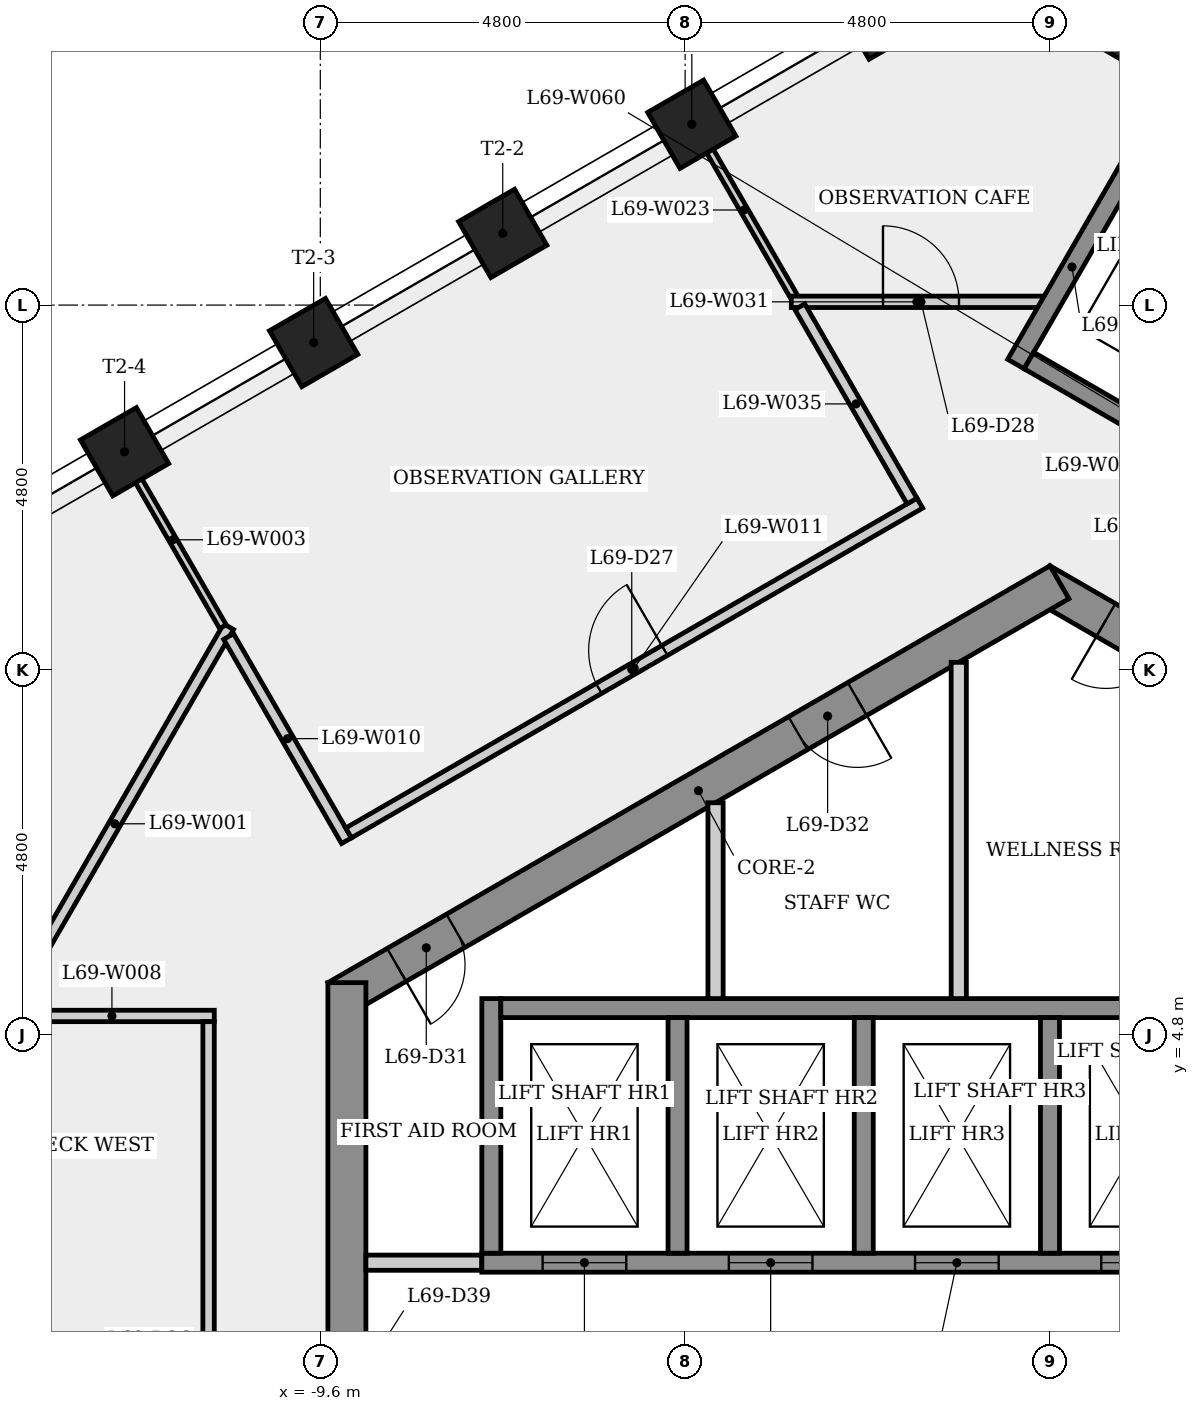
"""IFC4 building model, lengths in metres.
Left out: names, types, materials, properties, quantities, classifications, styles, units other than length and angle.
Written with IfcOpenShell. Run it as: python <this file> out.ifc"""

import sys

from ifc_helpers import new_model, si_unit, direction, frame, frame_2d, origin, origin_2d, place, context, subcontext, project, spatial, rectangle, extrude, element, fill, save


model = new_model("IFC4")
c1 = context("Model", 3, precision=1e-05, world=origin(), true_north=direction((0.0, 1.0)))
c2 = subcontext(c1, "Body", "Model", "MODEL_VIEW")
j1 = project(units=[si_unit("LENGTHUNIT", "METRE"), si_unit("PLANEANGLEUNIT", "RADIAN")], contexts=[c1])
p1 = place(None, origin())
s1 = spatial("IfcSite", under=j1, at=p1, CompositionType="ELEMENT")
p2 = place(p1, origin())
s2 = spatial("IfcBuilding", under=s1, at=p2, CompositionType="ELEMENT")
p3 = place(p2, frame((0.0, 0.0, 257.9)))
s3 = spatial("IfcBuildingStorey", under=s2, at=p3, CompositionType="ELEMENT", Elevation=257.9)
p4 = place(p3, frame((9.375, 5.268, 0.0), z_axis=(0.0, 0.0, 1.0), x_axis=(-0.866023993627, 0.500002442456, 0.0)))
e1 = element("IfcWall", 1, at=p4, inside=s3, PredefinedType="SHEAR", context=c2, shape_type="SweptSolid", body=[
    extrude(rectangle(XDim=10.97, YDim=0.5, at=frame_2d((5.485, 0.0))), origin(), (0.0, 0.0, 1.0), 5.0),
])
p5 = place(p4, frame((9.076, 0.0, 0.0)))
e2 = element("IfcOpeningElement", 2, at=p5, cuts=e1, PredefinedType="OPENING", context=c2, shape_type="SweptSolid", body=[
    extrude(rectangle(XDim=0.9, YDim=2.1, at=frame_2d((0.45, 1.05))), frame((0.0, 0.26, 0.0), z_axis=(0.0, -1.0, 0.0), x_axis=(1.0, 0.0, 0.0)), (0.0, 0.0, 1.0), 0.52),
])
p6 = place(p4, frame((3.858, 0.0, 0.0)))
e3 = element("IfcOpeningElement", 3, at=p6, cuts=e1, PredefinedType="OPENING", context=c2, shape_type="SweptSolid", body=[
    extrude(rectangle(XDim=0.9, YDim=2.1, at=frame_2d((0.45, 1.05))), frame((0.0, 0.26, 0.0), z_axis=(0.0, -1.0, 0.0), x_axis=(1.0, 0.0, 0.0)), (0.0, 0.0, 1.0), 0.52),
])
p7 = place(p3, frame((0.125, 10.753, 0.0), z_axis=(0.0, 0.0, 1.0), x_axis=(-0.866023993627, -0.500002442456, 0.0)))
e4 = element("IfcWall", 4, at=p7, inside=s3, PredefinedType="SHEAR", context=c2, shape_type="SweptSolid", body=[
    extrude(rectangle(XDim=10.97, YDim=0.5, at=frame_2d((5.485, 0.0))), origin(), (0.0, 0.0, 1.0), 5.0),
])
p8 = place(p7, frame((9.17, 0.0, 0.0)))
e5 = element("IfcOpeningElement", 5, at=p8, cuts=e4, PredefinedType="OPENING", context=c2, shape_type="SweptSolid", body=[
    extrude(rectangle(XDim=0.9, YDim=2.1, at=frame_2d((0.45, 1.05))), frame((0.0, 0.26, 0.0), z_axis=(0.0, -1.0, 0.0), x_axis=(1.0, 0.0, 0.0)), (0.0, 0.0, 1.0), 0.52),
])
p9 = place(p7, frame((3.073, 0.0, 0.0)))
e6 = element("IfcOpeningElement", 6, at=p9, cuts=e4, PredefinedType="OPENING", context=c2, shape_type="SweptSolid", body=[
    extrude(rectangle(XDim=0.9, YDim=2.1, at=frame_2d((0.45, 1.05))), frame((0.0, 0.26, 0.0), z_axis=(0.0, -1.0, 0.0), x_axis=(1.0, 0.0, 0.0)), (0.0, 0.0, 1.0), 0.52),
])
p10 = place(p3, frame((-9.25, 5.485, 0.0), z_axis=(0.0, 0.0, 1.0), x_axis=(0.0, -1.0, 0.0)))
e7 = element("IfcWall", 7, at=p10, inside=s3, PredefinedType="SHEAR", context=c2, shape_type="SweptSolid", body=[
    extrude(rectangle(XDim=10.97, YDim=0.5, at=frame_2d((5.485, 0.0))), origin(), (0.0, 0.0, 1.0), 5.0),
])
p11 = place(p10, frame((8.51, 0.0, 0.0)))
e8 = element("IfcOpeningElement", 8, at=p11, cuts=e7, PredefinedType="OPENING", context=c2, shape_type="SweptSolid", body=[
    extrude(rectangle(XDim=0.9, YDim=2.1, at=frame_2d((0.45, 1.05))), frame((0.0, 0.26, 0.0), z_axis=(0.0, -1.0, 0.0), x_axis=(1.0, 0.0, 0.0)), (0.0, 0.0, 1.0), 0.52),
])
p12 = place(p10, frame((4.685, 0.0, 0.0)))
e9 = element("IfcOpeningElement", 9, at=p12, cuts=e7, PredefinedType="OPENING", context=c2, shape_type="SweptSolid", body=[
    extrude(rectangle(XDim=1.6, YDim=2.1, at=frame_2d((0.8, 1.05))), frame((0.0, 0.26, 0.0), z_axis=(0.0, -1.0, 0.0), x_axis=(1.0, 0.0, 0.0)), (0.0, 0.0, 1.0), 0.52),
])
for number, where, z_axis, x_axis in (
    (10, (0.776, 18.216, 0.0), (0.0, 0.0, 1.0), (0.5, 0.866, 0.0)),
    (11, (-2.224, 18.216, 0.0), (0.0, 0.0, 1.0), (-0.5, 0.866, 0.0)),
    (12, (-4.712, 16.78, 0.0), (0.0, 0.0, 1.0), (-0.5, 0.866, 0.0)),
    (13, (-7.2, 15.343, 0.0), (0.0, 0.0, 1.0), (-0.5, 0.866, 0.0)),
    (14, (-9.688, 13.907, 0.0), (0.0, 0.0, 1.0), (-0.5, 0.866, 0.0)),
    (15, (-12.175, 12.47, 0.0), (0.0, 0.0, 1.0), (-0.5, 0.866, 0.0)),
):
    element("IfcColumn", number, at=place(p3, frame(where, z_axis=z_axis, x_axis=x_axis)), inside=s3, PredefinedType="COLUMN", context=c2, shape_type="SweptSolid", body=[
        extrude(rectangle(XDim=0.85, YDim=0.85, at=origin_2d()), origin(), (0.0, 0.0, 1.0), 5.0),
    ])
p13 = place(p3, frame((-13.801, 4.982, 0.0), z_axis=(0.0, 0.0, 1.0), x_axis=(0.499988265988, 0.866032178313, 0.0)))
e16 = element("IfcWall", 16, at=p13, inside=s3, PredefinedType="PARTITIONING", context=c2, shape_type="SweptSolid", body=[
    extrude(rectangle(XDim=5.99, YDim=0.15, at=frame_2d((2.995, 0.0))), origin(), (0.0, 0.0, 1.0), 4.6),
])
p14 = place(p3, frame((-12.201, 12.455, 0.0), z_axis=(0.0, 0.0, 1.0), x_axis=(0.499967916833, -0.866043926217, 0.0)))
e17 = element("IfcWall", 17, at=p14, inside=s3, PredefinedType="PARTITIONING", context=c2, shape_type="SweptSolid", body=[
    extrude(rectangle(XDim=2.64, YDim=0.1, at=frame_2d((1.32, 0.0))), origin(), (0.0, 0.0, 1.0), 4.6),
])
p15 = place(p3, frame((-10.995, 5.047, 0.0), z_axis=(0.0, 0.0, 1.0), x_axis=(-1.0, 0.0, 0.0)))
e18 = element("IfcWall", 18, at=p15, inside=s3, PredefinedType="PARTITIONING", context=c2, shape_type="SweptSolid", body=[
    extrude(rectangle(XDim=2.693, YDim=0.15, at=frame_2d((1.347, 0.0))), origin(), (0.0, 0.0, 1.0), 4.6),
])
p16 = place(p3, frame((-11.07, -4.972, 0.0), z_axis=(0.0, 0.0, 1.0), x_axis=(0.0, 1.0, 0.0)))
e19 = element("IfcWall", 19, at=p16, inside=s3, PredefinedType="PARTITIONING", context=c2, shape_type="SweptSolid", body=[
    extrude(rectangle(XDim=9.943, YDim=0.15, at=frame_2d((4.972, 0.0))), origin(), (0.0, 0.0, 1.0), 4.6),
])
p17 = place(p16, frame((4.472, 0.0, 0.0)))
e20 = element("IfcOpeningElement", 20, at=p17, cuts=e19, PredefinedType="OPENING", context=c2, shape_type="SweptSolid", body=[
    extrude(rectangle(XDim=1.0, YDim=2.1, at=frame_2d((0.5, 1.05))), frame((0.0, 0.085, 0.0), z_axis=(0.0, -1.0, 0.0), x_axis=(1.0, 0.0, 0.0)), (0.0, 0.0, 1.0), 0.17),
])
p18 = place(p3, frame((-10.806, 10.039, 0.0), z_axis=(0.0, 0.0, 1.0), x_axis=(0.499990416364, -0.866030936828, 0.0)))
e21 = element("IfcWall", 21, at=p18, inside=s3, PredefinedType="PARTITIONING", context=c2, shape_type="SweptSolid", body=[
    extrude(rectangle(XDim=3.102, YDim=0.15, at=frame_2d((1.551, 0.0))), origin(), (0.0, 0.0, 1.0), 4.6),
])
p19 = place(p3, frame((-9.228, 7.455, 0.0), z_axis=(0.0, 0.0, 1.0), x_axis=(0.866027239396, 0.499996820614, 0.0)))
e22 = element("IfcWall", 22, at=p19, inside=s3, PredefinedType="PARTITIONING", context=c2, shape_type="SweptSolid", body=[
    extrude(rectangle(XDim=8.678, YDim=0.15, at=frame_2d((4.339, 0.0))), origin(), (0.0, 0.0, 1.0), 4.6),
])
p20 = place(p19, frame((3.802, 0.0, 0.0)))
e23 = element("IfcOpeningElement", 23, at=p20, cuts=e22, PredefinedType="OPENING", context=c2, shape_type="SweptSolid", body=[
    extrude(rectangle(XDim=1.0, YDim=2.1, at=frame_2d((0.5, 1.05))), frame((0.0, 0.085, 0.0), z_axis=(0.0, -1.0, 0.0), x_axis=(1.0, 0.0, 0.0)), (0.0, 0.0, 1.0), 0.17),
])
p21 = place(p3, frame((-9.0, 1.8, 0.0), z_axis=(0.0, 0.0, 1.0), x_axis=(1.0, 0.0, 0.0)))
e24 = element("IfcWall", 24, at=p21, inside=s3, PredefinedType="PARTITIONING", context=c2, shape_type="SweptSolid", body=[
    extrude(rectangle(XDim=1.525, YDim=0.2, at=frame_2d((0.763, 0.0))), origin(), (0.0, 0.0, 1.0), 4.6),
])
p22 = place(p3, frame((-7.475, 1.8, 0.0), z_axis=(0.0, 0.0, 1.0), x_axis=(1.0, 0.0, 0.0)))
e25 = element("IfcWall", 25, at=p22, inside=s3, PredefinedType="SHEAR", context=c2, shape_type="SweptSolid", body=[
    extrude(rectangle(XDim=14.95, YDim=0.25, at=frame_2d((7.475, 0.0))), origin(), (0.0, 0.0, 1.0), 4.6),
])
p23 = place(p22, frame((0.8, 0.0, 0.0)))
e26 = element("IfcOpeningElement", 26, at=p23, cuts=e25, PredefinedType="OPENING", context=c2, shape_type="SweptSolid", body=[
    extrude(rectangle(XDim=1.1, YDim=2.1, at=frame_2d((0.55, 1.05))), frame((0.0, 0.135, 0.0), z_axis=(0.0, -1.0, 0.0), x_axis=(1.0, 0.0, 0.0)), (0.0, 0.0, 1.0), 0.27),
])
p24 = place(p22, frame((3.25, 0.0, 0.0)))
e27 = element("IfcOpeningElement", 27, at=p24, cuts=e25, PredefinedType="OPENING", context=c2, shape_type="SweptSolid", body=[
    extrude(rectangle(XDim=1.1, YDim=2.1, at=frame_2d((0.55, 1.05))), frame((0.0, 0.135, 0.0), z_axis=(0.0, -1.0, 0.0), x_axis=(1.0, 0.0, 0.0)), (0.0, 0.0, 1.0), 0.27),
])
p25 = place(p22, frame((5.7, 0.0, 0.0)))
e28 = element("IfcOpeningElement", 28, at=p25, cuts=e25, PredefinedType="OPENING", context=c2, shape_type="SweptSolid", body=[
    extrude(rectangle(XDim=1.1, YDim=2.1, at=frame_2d((0.55, 1.05))), frame((0.0, 0.135, 0.0), z_axis=(0.0, -1.0, 0.0), x_axis=(1.0, 0.0, 0.0)), (0.0, 0.0, 1.0), 0.27),
])
p26 = place(p22, frame((8.15, 0.0, 0.0)))
e29 = element("IfcOpeningElement", 29, at=p26, cuts=e25, PredefinedType="OPENING", context=c2, shape_type="SweptSolid", body=[
    extrude(rectangle(XDim=1.1, YDim=2.1, at=frame_2d((0.55, 1.05))), frame((0.0, 0.135, 0.0), z_axis=(0.0, -1.0, 0.0), x_axis=(1.0, 0.0, 0.0)), (0.0, 0.0, 1.0), 0.27),
])
p27 = place(p22, frame((10.6, 0.0, 0.0)))
e30 = element("IfcOpeningElement", 30, at=p27, cuts=e25, PredefinedType="OPENING", context=c2, shape_type="SweptSolid", body=[
    extrude(rectangle(XDim=1.1, YDim=2.1, at=frame_2d((0.55, 1.05))), frame((0.0, 0.135, 0.0), z_axis=(0.0, -1.0, 0.0), x_axis=(1.0, 0.0, 0.0)), (0.0, 0.0, 1.0), 0.27),
])
p28 = place(p22, frame((13.05, 0.0, 0.0)))
e31 = element("IfcOpeningElement", 31, at=p28, cuts=e25, PredefinedType="OPENING", context=c2, shape_type="SweptSolid", body=[
    extrude(rectangle(XDim=1.1, YDim=2.1, at=frame_2d((0.55, 1.05))), frame((0.0, 0.135, 0.0), z_axis=(0.0, -1.0, 0.0), x_axis=(1.0, 0.0, 0.0)), (0.0, 0.0, 1.0), 0.27),
])
p29 = place(p3, frame((-7.35, 1.925, 0.0), z_axis=(0.0, 0.0, 1.0), x_axis=(0.0, 1.0, 0.0)))
e32 = element("IfcWall", 32, at=p29, inside=s3, PredefinedType="SHEAR", context=c2, shape_type="SweptSolid", body=[
    extrude(rectangle(XDim=3.35, YDim=0.25, at=frame_2d((1.675, 0.0))), origin(), (0.0, 0.0, 1.0), 4.6),
])
p30 = place(p3, frame((-7.225, 5.15, 0.0), z_axis=(0.0, 0.0, 1.0), x_axis=(1.0, 0.0, 0.0)))
e33 = element("IfcWall", 33, at=p30, inside=s3, PredefinedType="SHEAR", context=c2, shape_type="SweptSolid", body=[
    extrude(rectangle(XDim=14.7, YDim=0.25, at=frame_2d((7.35, 0.0))), origin(), (0.0, 0.0, 1.0), 4.6),
])
p31 = place(p3, frame((-4.9, 5.025, 0.0), z_axis=(0.0, 0.0, 1.0), x_axis=(0.0, -1.0, 0.0)))
e34 = element("IfcWall", 34, at=p31, inside=s3, PredefinedType="SHEAR", context=c2, shape_type="SweptSolid", body=[
    extrude(rectangle(XDim=3.1, YDim=0.25, at=frame_2d((1.55, 0.0))), origin(), (0.0, 0.0, 1.0), 4.6),
])
p32 = place(p3, frame((-4.686, 16.795, 0.0), z_axis=(0.0, 0.0, 1.0), x_axis=(0.49999722832, -0.866027004008, 0.0)))
e35 = element("IfcWall", 35, at=p32, inside=s3, PredefinedType="PARTITIONING", context=c2, shape_type="SweptSolid", body=[
    extrude(rectangle(XDim=2.641, YDim=0.1, at=frame_2d((1.32, 0.0))), origin(), (0.0, 0.0, 1.0), 4.6),
])
p33 = place(p3, frame((-4.4, 7.852, 0.0), z_axis=(0.0, 0.0, 1.0), x_axis=(0.0, -1.0, 0.0)))
e36 = element("IfcWall", 36, at=p33, inside=s3, PredefinedType="PARTITIONING", context=c2, shape_type="SweptSolid", body=[
    extrude(rectangle(XDim=2.577, YDim=0.2, at=frame_2d((1.289, 0.0))), origin(), (0.0, 0.0, 1.0), 4.6),
])
p34 = place(p3, frame((-3.403, 14.443, 0.0), z_axis=(0.0, 0.0, 1.0), x_axis=(1.0, 0.0, 0.0)))
e37 = element("IfcWall", 37, at=p34, inside=s3, PredefinedType="PARTITIONING", context=c2, shape_type="SweptSolid", body=[
    extrude(rectangle(XDim=3.303, YDim=0.15, at=frame_2d((1.652, 0.0))), origin(), (0.0, 0.0, 1.0), 4.6),
])
p35 = place(p34, frame((1.206, 0.0, 0.0)))
e38 = element("IfcOpeningElement", 38, at=p35, cuts=e37, PredefinedType="OPENING", context=c2, shape_type="SweptSolid", body=[
    extrude(rectangle(XDim=1.0, YDim=2.1, at=frame_2d((0.5, 1.05))), frame((0.0, 0.085, 0.0), z_axis=(0.0, -1.0, 0.0), x_axis=(1.0, 0.0, 0.0)), (0.0, 0.0, 1.0), 0.17),
])
p36 = place(p3, frame((-2.45, 5.025, 0.0), z_axis=(0.0, 0.0, 1.0), x_axis=(0.0, -1.0, 0.0)))
e39 = element("IfcWall", 39, at=p36, inside=s3, PredefinedType="SHEAR", context=c2, shape_type="SweptSolid", body=[
    extrude(rectangle(XDim=3.1, YDim=0.25, at=frame_2d((1.55, 0.0))), origin(), (0.0, 0.0, 1.0), 4.6),
])
p37 = place(p3, frame((-1.815, 11.821, 0.0), z_axis=(0.0, 0.0, 1.0), x_axis=(-0.499999254532, 0.86602583418, 0.0)))
e40 = element("IfcWall", 40, at=p37, inside=s3, PredefinedType="PARTITIONING", context=c2, shape_type="SweptSolid", body=[
    extrude(rectangle(XDim=2.952, YDim=0.15, at=frame_2d((1.476, 0.0))), origin(), (0.0, 0.0, 1.0), 4.6),
])
p38 = place(p3, frame((-1.2, 9.699, 0.0), z_axis=(0.0, 0.0, 1.0), x_axis=(0.0, -1.0, 0.0)))
e41 = element("IfcWall", 41, at=p38, inside=s3, PredefinedType="PARTITIONING", context=c2, shape_type="SweptSolid", body=[
    extrude(rectangle(XDim=4.425, YDim=0.2, at=frame_2d((2.212, 0.0))), origin(), (0.0, 0.0, 1.0), 4.6),
])
p39 = place(p3, frame((-0.448, 13.624, 0.0), z_axis=(0.0, 0.0, 1.0), x_axis=(0.500037662692, 0.866003658127, 0.0)))
e42 = element("IfcWall", 42, at=p39, inside=s3, PredefinedType="SHEAR", context=c2, shape_type="SweptSolid", body=[
    extrude(rectangle(XDim=2.95, YDim=0.25, at=frame_2d((1.475, 0.0))), origin(), (0.0, 0.0, 1.0), 4.6),
])
p40 = place(p3, frame((0.0, 5.025, 0.0), z_axis=(0.0, 0.0, 1.0), x_axis=(0.0, -1.0, 0.0)))
e43 = element("IfcWall", 43, at=p40, inside=s3, PredefinedType="SHEAR", context=c2, shape_type="SweptSolid", body=[
    extrude(rectangle(XDim=3.1, YDim=0.25, at=frame_2d((1.55, 0.0))), origin(), (0.0, 0.0, 1.0), 4.6),
])
p41 = place(p3, frame((2.581, 12.02, 0.0), z_axis=(0.0, 0.0, 1.0), x_axis=(-0.866040211805, 0.499974350878, 0.0)))
e44 = element("IfcWall", 44, at=p41, inside=s3, PredefinedType="SHEAR", context=c2, shape_type="SweptSolid", body=[
    extrude(rectangle(XDim=3.3, YDim=0.25, at=frame_2d((1.65, 0.0))), origin(), (0.0, 0.0, 1.0), 4.6),
])
p42 = place(p23, origin())
e45 = element("IfcDoor", 45, at=p42, inside=s3, OperationType="SLIDING_TO_LEFT", PredefinedType="DOOR", context=c2, shape_type="SweptSolid", body=[
    extrude(rectangle(XDim=1.1, YDim=2.1, at=frame_2d((0.55, 1.05))), frame((0.0, 0.025, 0.0), z_axis=(0.0, -1.0, 0.0), x_axis=(1.0, 0.0, 0.0)), (0.0, 0.0, 1.0), 0.05),
])
fill(e26, e45)
p43 = place(p24, origin())
e46 = element("IfcDoor", 46, at=p43, inside=s3, OperationType="SLIDING_TO_LEFT", PredefinedType="DOOR", context=c2, shape_type="SweptSolid", body=[
    extrude(rectangle(XDim=1.1, YDim=2.1, at=frame_2d((0.55, 1.05))), frame((0.0, 0.025, 0.0), z_axis=(0.0, -1.0, 0.0), x_axis=(1.0, 0.0, 0.0)), (0.0, 0.0, 1.0), 0.05),
])
fill(e27, e46)
p44 = place(p25, origin())
e47 = element("IfcDoor", 47, at=p44, inside=s3, OperationType="SLIDING_TO_LEFT", PredefinedType="DOOR", context=c2, shape_type="SweptSolid", body=[
    extrude(rectangle(XDim=1.1, YDim=2.1, at=frame_2d((0.55, 1.05))), frame((0.0, 0.025, 0.0), z_axis=(0.0, -1.0, 0.0), x_axis=(1.0, 0.0, 0.0)), (0.0, 0.0, 1.0), 0.05),
])
fill(e28, e47)
p45 = place(p26, origin())
e48 = element("IfcDoor", 48, at=p45, inside=s3, OperationType="SLIDING_TO_LEFT", PredefinedType="DOOR", context=c2, shape_type="SweptSolid", body=[
    extrude(rectangle(XDim=1.1, YDim=2.1, at=frame_2d((0.55, 1.05))), frame((0.0, 0.025, 0.0), z_axis=(0.0, -1.0, 0.0), x_axis=(1.0, 0.0, 0.0)), (0.0, 0.0, 1.0), 0.05),
])
fill(e29, e48)
p46 = place(p20, origin())
e49 = element("IfcDoor", 49, at=p46, inside=s3, OperationType="SINGLE_SWING_RIGHT", PredefinedType="DOOR", context=c2, shape_type="SweptSolid", body=[
    extrude(rectangle(XDim=1.0, YDim=2.1, at=frame_2d((0.5, 1.05))), frame((0.0, 0.025, 0.0), z_axis=(0.0, -1.0, 0.0), x_axis=(1.0, 0.0, 0.0)), (0.0, 0.0, 1.0), 0.05),
])
fill(e23, e49)
p47 = place(p35, origin())
e50 = element("IfcDoor", 50, at=p47, inside=s3, OperationType="SINGLE_SWING_LEFT", PredefinedType="DOOR", context=c2, shape_type="SweptSolid", body=[
    extrude(rectangle(XDim=1.0, YDim=2.1, at=frame_2d((0.5, 1.05))), frame((0.0, 0.025, 0.0), z_axis=(0.0, -1.0, 0.0), x_axis=(1.0, 0.0, 0.0)), (0.0, 0.0, 1.0), 0.05),
])
fill(e38, e50)
p48 = place(p8, origin())
e51 = element("IfcDoor", 51, at=p48, inside=s3, OperationType="SINGLE_SWING_RIGHT", PredefinedType="DOOR", context=c2, shape_type="SweptSolid", body=[
    extrude(rectangle(XDim=0.9, YDim=2.1, at=frame_2d((0.45, 1.05))), frame((0.0, 0.025, 0.0), z_axis=(0.0, -1.0, 0.0), x_axis=(1.0, 0.0, 0.0)), (0.0, 0.0, 1.0), 0.05),
])
fill(e5, e51)
p49 = place(p9, origin())
e52 = element("IfcDoor", 52, at=p49, inside=s3, OperationType="SINGLE_SWING_LEFT", PredefinedType="DOOR", context=c2, shape_type="SweptSolid", body=[
    extrude(rectangle(XDim=0.9, YDim=2.1, at=frame_2d((0.45, 1.05))), frame((0.0, 0.025, 0.0), z_axis=(0.0, -1.0, 0.0), x_axis=(1.0, 0.0, 0.0)), (0.0, 0.0, 1.0), 0.05),
])
fill(e6, e52)
p50 = place(p5, origin())
e53 = element("IfcDoor", 53, at=p50, inside=s3, OperationType="SINGLE_SWING_RIGHT", PredefinedType="DOOR", context=c2, shape_type="SweptSolid", body=[
    extrude(rectangle(XDim=0.9, YDim=2.1, at=frame_2d((0.45, 1.05))), frame((0.0, 0.025, 0.0), z_axis=(0.0, -1.0, 0.0), x_axis=(1.0, 0.0, 0.0)), (0.0, 0.0, 1.0), 0.05),
])
fill(e2, e53)
save(model, sys.argv[1])
